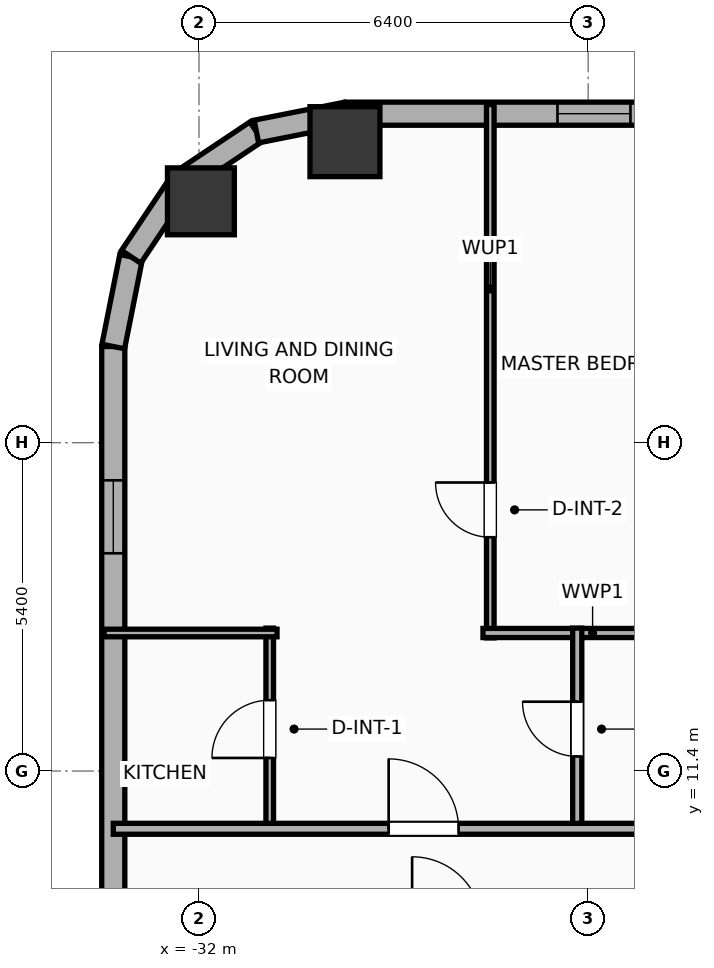
"""IFC4 building model, lengths in metres.
Left out: names, types, materials, properties, quantities, classifications, styles, units other than length and angle.
Written with IfcOpenShell. Run it as: python <this file> out.ifc"""

import sys

from ifc_helpers import new_model, si_unit, direction, frame, frame_2d, origin, origin_2d, place, context, subcontext, project, spatial, rectangle, hollow_rectangle, hollow_circle, extrude, element, fill, save


model = new_model("IFC4")
c1 = context("Model", 3, precision=1e-05, world=origin(), true_north=direction((0.0, 1.0)))
c2 = subcontext(c1, "Body", "Model", "MODEL_VIEW")
j1 = project(units=[si_unit("LENGTHUNIT", "METRE"), si_unit("PLANEANGLEUNIT", "RADIAN")], contexts=[c1])
p1 = place(None, origin())
s1 = spatial("IfcSite", under=j1, at=p1, CompositionType="ELEMENT")
p2 = place(p1, origin())
s2 = spatial("IfcBuilding", under=s1, at=p2, CompositionType="ELEMENT")
p3 = place(p2, frame((0.0, 0.0, 57.2)))
s3 = spatial("IfcBuildingStorey", under=s2, at=p3, CompositionType="ELEMENT", Elevation=57.2)
p4 = place(p3, frame((-29.6, 21.75, 0.0), z_axis=(0.0, 0.0, 1.0), x_axis=(1.0, 0.0, 0.0)))
e1 = element("IfcColumn", 1, at=p4, inside=s3, PredefinedType="COLUMN", context=c2, shape_type="SweptSolid", body=[
    extrude(hollow_rectangle(XDim=1.15, YDim=1.15, WallThickness=0.04, at=origin_2d()), origin(), (0.0, 0.0, 1.0), 3.9),
])
p5 = place(p3, frame((-31.969, 20.769, 0.0), z_axis=(0.0, 0.0, 1.0), x_axis=(1.0, 0.0, 0.0)))
e2 = element("IfcColumn", 2, at=p5, inside=s3, PredefinedType="COLUMN", context=c2, shape_type="SweptSolid", body=[
    extrude(hollow_circle(Radius=0.55, WallThickness=0.036, at=origin_2d()), origin(), (0.0, 0.0, 1.0), 3.9),
])
p6 = place(p3, frame((-33.41, -18.381, 0.0), z_axis=(0.0, 0.0, 1.0), x_axis=(0.0, 1.0, 0.0)))
e3 = element("IfcWall", 3, at=p6, inside=s3, PredefinedType="ELEMENTEDWALL", context=c2, shape_type="SweptSolid", body=[
    extrude(rectangle(XDim=36.763, YDim=0.38, at=frame_2d((18.381, 0.0))), origin(), (0.0, 0.0, 1.0), 3.65),
])
p7 = place(p6, frame((33.362, 0.0, 0.75)))
e4 = element("IfcOpeningElement", 4, at=p7, cuts=e3, PredefinedType="OPENING", context=c2, shape_type="SweptSolid", body=[
    extrude(rectangle(XDim=1.2, YDim=2.05, at=frame_2d((0.6, 1.025))), frame((0.0, 0.2, 0.0), z_axis=(0.0, -1.0, 0.0), x_axis=(1.0, 0.0, 0.0)), (0.0, 0.0, 1.0), 0.4),
])
p8 = place(p6, frame((22.301, 0.0, 0.75)))
e5 = element("IfcOpeningElement", 5, at=p8, cuts=e3, PredefinedType="OPENING", context=c2, shape_type="SweptSolid", body=[
    extrude(rectangle(XDim=1.2, YDim=2.05, at=frame_2d((0.6, 1.025))), frame((0.0, 0.2, 0.0), z_axis=(0.0, -1.0, 0.0), x_axis=(1.0, 0.0, 0.0)), (0.0, 0.0, 1.0), 0.4),
])
p9 = place(p6, frame((13.401, 0.0, 0.75)))
e6 = element("IfcOpeningElement", 6, at=p9, cuts=e3, PredefinedType="OPENING", context=c2, shape_type="SweptSolid", body=[
    extrude(rectangle(XDim=1.2, YDim=2.05, at=frame_2d((0.6, 1.025))), frame((0.0, 0.2, 0.0), z_axis=(0.0, -1.0, 0.0), x_axis=(1.0, 0.0, 0.0)), (0.0, 0.0, 1.0), 0.4),
])
p10 = place(p3, frame((-33.41, 18.381, 0.0), z_axis=(0.0, 0.0, 1.0), x_axis=(0.195086038585, 0.980786132421, 0.0)))
e7 = element("IfcWall", 7, at=p10, inside=s3, PredefinedType="ELEMENTEDWALL", context=c2, shape_type="SweptSolid", body=[
    extrude(rectangle(XDim=1.504, YDim=0.38, at=frame_2d((0.752, 0.0))), origin(), (0.0, 0.0, 1.0), 3.65),
])
p11 = place(p3, frame((-33.116, 19.857, 0.0), z_axis=(0.0, 0.0, 1.0), x_axis=(0.555572577804, 0.831468045563, 0.0)))
e8 = element("IfcWall", 8, at=p11, inside=s3, PredefinedType="ELEMENTEDWALL", context=c2, shape_type="SweptSolid", body=[
    extrude(rectangle(XDim=1.485, YDim=0.38, at=frame_2d((0.742, 0.0))), origin(), (0.0, 0.0, 1.0), 3.65),
])
p12 = place(p3, frame((-32.292, 21.091, 0.0), z_axis=(0.0, 0.0, 1.0), x_axis=(0.831442848281, 0.555610286119, 0.0)))
e9 = element("IfcWall", 9, at=p12, inside=s3, PredefinedType="ELEMENTEDWALL", context=c2, shape_type="SweptSolid", body=[
    extrude(rectangle(XDim=1.485, YDim=0.38, at=frame_2d((0.743, 0.0))), origin(), (0.0, 0.0, 1.0), 3.65),
])
p13 = place(p3, frame((-31.057, 21.917, 0.0), z_axis=(0.0, 0.0, 1.0), x_axis=(0.980786132421, 0.195086038585, 0.0)))
e10 = element("IfcWall", 10, at=p13, inside=s3, PredefinedType="ELEMENTEDWALL", context=c2, shape_type="SweptSolid", body=[
    extrude(rectangle(XDim=1.504, YDim=0.38, at=frame_2d((0.752, 0.0))), origin(), (0.0, 0.0, 1.0), 3.65),
])
p14 = place(p3, frame((-29.581, 22.21, 0.0), z_axis=(0.0, 0.0, 1.0), x_axis=(1.0, 0.0, 0.0)))
e11 = element("IfcWall", 11, at=p14, inside=s3, PredefinedType="ELEMENTEDWALL", context=c2, shape_type="SweptSolid", body=[
    extrude(rectangle(XDim=51.963, YDim=0.38, at=frame_2d((25.981, 0.0))), origin(), (0.0, 0.0, 1.0), 3.65),
])
p15 = place(p14, frame((6.61, 0.0, 0.75)))
e12 = element("IfcOpeningElement", 12, at=p15, cuts=e11, PredefinedType="OPENING", context=c2, shape_type="SweptSolid", body=[
    extrude(rectangle(XDim=2.4, YDim=2.1, at=frame_2d((1.2, 1.05))), frame((0.0, 0.2, 0.0), z_axis=(0.0, -1.0, 0.0), x_axis=(1.0, 0.0, 0.0)), (0.0, 0.0, 1.0), 0.4),
])
p16 = place(p14, frame((24.781, 0.0, 0.75)))
e13 = element("IfcOpeningElement", 13, at=p16, cuts=e11, PredefinedType="OPENING", context=c2, shape_type="SweptSolid", body=[
    extrude(rectangle(XDim=2.4, YDim=2.1, at=frame_2d((1.2, 1.05))), frame((0.0, 0.2, 0.0), z_axis=(0.0, -1.0, 0.0), x_axis=(1.0, 0.0, 0.0)), (0.0, 0.0, 1.0), 0.4),
])
p17 = place(p14, frame((42.952, 0.0, 0.75)))
e14 = element("IfcOpeningElement", 14, at=p17, cuts=e11, PredefinedType="OPENING", context=c2, shape_type="SweptSolid", body=[
    extrude(rectangle(XDim=2.4, YDim=2.1, at=frame_2d((1.2, 1.05))), frame((0.0, 0.2, 0.0), z_axis=(0.0, -1.0, 0.0), x_axis=(1.0, 0.0, 0.0)), (0.0, 0.0, 1.0), 0.4),
])
p18 = place(p14, frame((3.476, 0.0, 0.75)))
e15 = element("IfcOpeningElement", 15, at=p18, cuts=e11, PredefinedType="OPENING", context=c2, shape_type="SweptSolid", body=[
    extrude(rectangle(XDim=1.2, YDim=2.05, at=frame_2d((0.6, 1.025))), frame((0.0, 0.2, 0.0), z_axis=(0.0, -1.0, 0.0), x_axis=(1.0, 0.0, 0.0)), (0.0, 0.0, 1.0), 0.4),
])
p19 = place(p14, frame((11.236, 0.0, 0.75)))
e16 = element("IfcOpeningElement", 16, at=p19, cuts=e11, PredefinedType="OPENING", context=c2, shape_type="SweptSolid", body=[
    extrude(rectangle(XDim=1.2, YDim=2.05, at=frame_2d((0.6, 1.025))), frame((0.0, 0.2, 0.0), z_axis=(0.0, -1.0, 0.0), x_axis=(1.0, 0.0, 0.0)), (0.0, 0.0, 1.0), 0.4),
])
p20 = place(p14, frame((14.576, 0.0, 0.75)))
e17 = element("IfcOpeningElement", 17, at=p20, cuts=e11, PredefinedType="OPENING", context=c2, shape_type="SweptSolid", body=[
    extrude(rectangle(XDim=1.2, YDim=2.05, at=frame_2d((0.6, 1.025))), frame((0.0, 0.2, 0.0), z_axis=(0.0, -1.0, 0.0), x_axis=(1.0, 0.0, 0.0)), (0.0, 0.0, 1.0), 0.4),
])
p21 = place(p14, frame((18.276, 0.0, 0.75)))
e18 = element("IfcOpeningElement", 18, at=p21, cuts=e11, PredefinedType="OPENING", context=c2, shape_type="SweptSolid", body=[
    extrude(rectangle(XDim=1.2, YDim=2.05, at=frame_2d((0.6, 1.025))), frame((0.0, 0.2, 0.0), z_axis=(0.0, -1.0, 0.0), x_axis=(1.0, 0.0, 0.0)), (0.0, 0.0, 1.0), 0.4),
])
p22 = place(p14, frame((21.976, 0.0, 0.75)))
e19 = element("IfcOpeningElement", 19, at=p22, cuts=e11, PredefinedType="OPENING", context=c2, shape_type="SweptSolid", body=[
    extrude(rectangle(XDim=1.2, YDim=2.05, at=frame_2d((0.6, 1.025))), frame((0.0, 0.2, 0.0), z_axis=(0.0, -1.0, 0.0), x_axis=(1.0, 0.0, 0.0)), (0.0, 0.0, 1.0), 0.4),
])
p23 = place(p14, frame((29.136, 0.0, 0.75)))
e20 = element("IfcOpeningElement", 20, at=p23, cuts=e11, PredefinedType="OPENING", context=c2, shape_type="SweptSolid", body=[
    extrude(rectangle(XDim=1.2, YDim=2.05, at=frame_2d((0.6, 1.025))), frame((0.0, 0.2, 0.0), z_axis=(0.0, -1.0, 0.0), x_axis=(1.0, 0.0, 0.0)), (0.0, 0.0, 1.0), 0.4),
])
p24 = place(p14, frame((33.076, 0.0, 0.75)))
e21 = element("IfcOpeningElement", 21, at=p24, cuts=e11, PredefinedType="OPENING", context=c2, shape_type="SweptSolid", body=[
    extrude(rectangle(XDim=1.2, YDim=2.05, at=frame_2d((0.6, 1.025))), frame((0.0, 0.2, 0.0), z_axis=(0.0, -1.0, 0.0), x_axis=(1.0, 0.0, 0.0)), (0.0, 0.0, 1.0), 0.4),
])
p25 = place(p14, frame((36.776, 0.0, 0.75)))
e22 = element("IfcOpeningElement", 22, at=p25, cuts=e11, PredefinedType="OPENING", context=c2, shape_type="SweptSolid", body=[
    extrude(rectangle(XDim=1.2, YDim=2.05, at=frame_2d((0.6, 1.025))), frame((0.0, 0.2, 0.0), z_axis=(0.0, -1.0, 0.0), x_axis=(1.0, 0.0, 0.0)), (0.0, 0.0, 1.0), 0.4),
])
p26 = place(p14, frame((39.931, 0.0, 0.75)))
e23 = element("IfcOpeningElement", 23, at=p26, cuts=e11, PredefinedType="OPENING", context=c2, shape_type="SweptSolid", body=[
    extrude(rectangle(XDim=0.85, YDim=2.05, at=frame_2d((0.425, 1.025))), frame((0.0, 0.2, 0.0), z_axis=(0.0, -1.0, 0.0), x_axis=(1.0, 0.0, 0.0)), (0.0, 0.0, 1.0), 0.4),
])
p27 = place(p14, frame((47.469, 0.0, 0.75)))
e24 = element("IfcOpeningElement", 24, at=p27, cuts=e11, PredefinedType="OPENING", context=c2, shape_type="SweptSolid", body=[
    extrude(rectangle(XDim=1.2, YDim=2.05, at=frame_2d((0.6, 1.025))), frame((0.0, 0.2, 0.0), z_axis=(0.0, -1.0, 0.0), x_axis=(1.0, 0.0, 0.0)), (0.0, 0.0, 1.0), 0.4),
])
p28 = place(p14, frame((49.581, 0.0, 0.75)))
e25 = element("IfcOpeningElement", 25, at=p28, cuts=e11, PredefinedType="OPENING", context=c2, shape_type="SweptSolid", body=[
    extrude(rectangle(XDim=1.2, YDim=2.05, at=frame_2d((0.6, 1.025))), frame((0.0, 0.2, 0.0), z_axis=(0.0, -1.0, 0.0), x_axis=(1.0, 0.0, 0.0)), (0.0, 0.0, 1.0), 0.4),
])
p29 = place(p3, frame((-27.21, 13.59, 0.0), z_axis=(0.0, 0.0, 1.0), x_axis=(0.0, 1.0, 0.0)))
e26 = element("IfcWall", 26, at=p29, inside=s3, PredefinedType="PARTITIONING", context=c2, shape_type="SweptSolid", body=[
    extrude(rectangle(XDim=8.77, YDim=0.125, at=frame_2d((4.385, 0.0))), origin(), (0.0, 0.0, 1.0), 3.65),
])
p30 = place(p29, frame((1.655, 0.0, 0.0)))
e27 = element("IfcOpeningElement", 27, at=p30, cuts=e26, PredefinedType="OPENING", context=c2, shape_type="SweptSolid", body=[
    extrude(rectangle(XDim=0.9, YDim=2.05, at=frame_2d((0.45, 1.025))), frame((0.0, 0.073, 0.0), z_axis=(0.0, -1.0, 0.0), x_axis=(1.0, 0.0, 0.0)), (0.0, 0.0, 1.0), 0.145),
])
p31 = place(p3, frame((-27.33, 13.67, 0.0), z_axis=(0.0, 0.0, 1.0), x_axis=(1.0, 0.0, 0.0)))
e28 = element("IfcWall", 28, at=p31, inside=s3, PredefinedType="PLUMBINGWALL", context=c2, shape_type="SweptSolid", body=[
    extrude(rectangle(XDim=3.605, YDim=0.15, at=frame_2d((1.802, 0.0))), origin(), (0.0, 0.0, 1.0), 3.65),
])
p32 = place(p3, frame((-30.837, 10.43, 0.0), z_axis=(0.0, 0.0, 1.0), x_axis=(0.0, 1.0, 0.0)))
e29 = element("IfcWall", 29, at=p32, inside=s3, PredefinedType="PARTITIONING", context=c2, shape_type="SweptSolid", body=[
    extrude(rectangle(XDim=3.32, YDim=0.125, at=frame_2d((1.66, 0.0))), origin(), (0.0, 0.0, 1.0), 3.65),
])
p33 = place(p32, frame((1.185, 0.0, 0.0)))
e30 = element("IfcOpeningElement", 30, at=p33, cuts=e29, PredefinedType="OPENING", context=c2, shape_type="SweptSolid", body=[
    extrude(rectangle(XDim=0.95, YDim=2.05, at=frame_2d((0.475, 1.025))), frame((0.0, 0.073, 0.0), z_axis=(0.0, -1.0, 0.0), x_axis=(1.0, 0.0, 0.0)), (0.0, 0.0, 1.0), 0.145),
])
p34 = place(p3, frame((-33.56, 13.67, 0.0), z_axis=(0.0, 0.0, 1.0), x_axis=(1.0, 0.0, 0.0)))
e31 = element("IfcWall", 31, at=p34, inside=s3, PredefinedType="PARTITIONING", context=c2, shape_type="SweptSolid", body=[
    extrude(rectangle(XDim=2.843, YDim=0.125, at=frame_2d((1.421, 0.0))), origin(), (0.0, 0.0, 1.0), 3.65),
])
p35 = place(p3, frame((-25.78, 10.43, 0.0), z_axis=(0.0, 0.0, 1.0), x_axis=(0.0, 1.0, 0.0)))
e32 = element("IfcWall", 32, at=p35, inside=s3, PredefinedType="PLUMBINGWALL", context=c2, shape_type="SweptSolid", body=[
    extrude(rectangle(XDim=3.32, YDim=0.15, at=frame_2d((1.66, 0.0))), origin(), (0.0, 0.0, 1.0), 3.65),
])
p36 = place(p35, frame((1.21, 0.0, 0.0)))
e33 = element("IfcOpeningElement", 33, at=p36, cuts=e32, PredefinedType="OPENING", context=c2, shape_type="SweptSolid", body=[
    extrude(rectangle(XDim=0.9, YDim=2.05, at=frame_2d((0.45, 1.025))), frame((0.0, 0.085, 0.0), z_axis=(0.0, -1.0, 0.0), x_axis=(1.0, 0.0, 0.0)), (0.0, 0.0, 1.0), 0.17),
])
p37 = place(p3, frame((-33.41, 10.45, 0.0), z_axis=(0.0, 0.0, 1.0), x_axis=(1.0, 0.0, 0.0)))
e34 = element("IfcWall", 34, at=p37, inside=s3, PredefinedType="PARTITIONING", context=c2, shape_type="SweptSolid", body=[
    extrude(rectangle(XDim=59.62, YDim=0.18, at=frame_2d((29.81, 0.0))), origin(), (0.0, 0.0, 1.0), 3.65),
])
p38 = place(p37, frame((4.529, 0.0, 0.0)))
e35 = element("IfcOpeningElement", 35, at=p38, cuts=e34, PredefinedType="OPENING", context=c2, shape_type="SweptSolid", body=[
    extrude(rectangle(XDim=1.15, YDim=2.05, at=frame_2d((0.575, 1.025))), frame((0.0, 0.1, 0.0), z_axis=(0.0, -1.0, 0.0), x_axis=(1.0, 0.0, 0.0)), (0.0, 0.0, 1.0), 0.2),
])
p39 = place(p37, frame((12.899, 0.0, 0.0)))
e36 = element("IfcOpeningElement", 36, at=p39, cuts=e34, PredefinedType="OPENING", context=c2, shape_type="SweptSolid", body=[
    extrude(rectangle(XDim=1.15, YDim=2.05, at=frame_2d((0.575, 1.025))), frame((0.0, 0.1, 0.0), z_axis=(0.0, -1.0, 0.0), x_axis=(1.0, 0.0, 0.0)), (0.0, 0.0, 1.0), 0.2),
])
p40 = place(p37, frame((20.298, 0.0, 0.0)))
e37 = element("IfcOpeningElement", 37, at=p40, cuts=e34, PredefinedType="OPENING", context=c2, shape_type="SweptSolid", body=[
    extrude(rectangle(XDim=1.15, YDim=2.05, at=frame_2d((0.575, 1.025))), frame((0.0, 0.1, 0.0), z_axis=(0.0, -1.0, 0.0), x_axis=(1.0, 0.0, 0.0)), (0.0, 0.0, 1.0), 0.2),
])
p41 = place(p37, frame((27.703, 0.0, 0.0)))
e38 = element("IfcOpeningElement", 38, at=p41, cuts=e34, PredefinedType="OPENING", context=c2, shape_type="SweptSolid", body=[
    extrude(rectangle(XDim=1.15, YDim=2.05, at=frame_2d((0.575, 1.025))), frame((0.0, 0.1, 0.0), z_axis=(0.0, -1.0, 0.0), x_axis=(1.0, 0.0, 0.0)), (0.0, 0.0, 1.0), 0.2),
])
p42 = place(p37, frame((35.102, 0.0, 0.0)))
e39 = element("IfcOpeningElement", 39, at=p42, cuts=e34, PredefinedType="OPENING", context=c2, shape_type="SweptSolid", body=[
    extrude(rectangle(XDim=1.15, YDim=2.05, at=frame_2d((0.575, 1.025))), frame((0.0, 0.1, 0.0), z_axis=(0.0, -1.0, 0.0), x_axis=(1.0, 0.0, 0.0)), (0.0, 0.0, 1.0), 0.2),
])
p43 = place(p37, frame((42.5, 0.0, 0.0)))
e40 = element("IfcOpeningElement", 40, at=p43, cuts=e34, PredefinedType="OPENING", context=c2, shape_type="SweptSolid", body=[
    extrude(rectangle(XDim=1.15, YDim=2.05, at=frame_2d((0.575, 1.025))), frame((0.0, 0.1, 0.0), z_axis=(0.0, -1.0, 0.0), x_axis=(1.0, 0.0, 0.0)), (0.0, 0.0, 1.0), 0.2),
])
p44 = place(p37, frame((48.099, 0.0, 0.0)))
e41 = element("IfcOpeningElement", 41, at=p44, cuts=e34, PredefinedType="OPENING", context=c2, shape_type="SweptSolid", body=[
    extrude(rectangle(XDim=1.15, YDim=2.05, at=frame_2d((0.575, 1.025))), frame((0.0, 0.1, 0.0), z_axis=(0.0, -1.0, 0.0), x_axis=(1.0, 0.0, 0.0)), (0.0, 0.0, 1.0), 0.2),
])
p45 = place(p37, frame((56.117, 0.0, 0.0)))
e42 = element("IfcOpeningElement", 42, at=p45, cuts=e34, PredefinedType="OPENING", context=c2, shape_type="SweptSolid", body=[
    extrude(rectangle(XDim=0.9, YDim=2.05, at=frame_2d((0.45, 1.025))), frame((0.0, 0.1, 0.0), z_axis=(0.0, -1.0, 0.0), x_axis=(1.0, 0.0, 0.0)), (0.0, 0.0, 1.0), 0.2),
])
p46 = place(p7, origin())
e43 = element("IfcWindow", 43, at=p46, inside=s3, PartitioningType="SINGLE_PANEL", PredefinedType="WINDOW", context=c2, shape_type="SweptSolid", body=[
    extrude(rectangle(XDim=1.2, YDim=2.05, at=frame_2d((0.6, 1.025))), frame((0.0, 0.03, 0.0), z_axis=(0.0, -1.0, 0.0), x_axis=(1.0, 0.0, 0.0)), (0.0, 0.0, 1.0), 0.06),
])
fill(e4, e43)
p47 = place(p18, origin())
e44 = element("IfcWindow", 44, at=p47, inside=s3, PartitioningType="SINGLE_PANEL", PredefinedType="WINDOW", context=c2, shape_type="SweptSolid", body=[
    extrude(rectangle(XDim=1.2, YDim=2.05, at=frame_2d((0.6, 1.025))), frame((0.0, 0.03, 0.0), z_axis=(0.0, -1.0, 0.0), x_axis=(1.0, 0.0, 0.0)), (0.0, 0.0, 1.0), 0.06),
])
fill(e15, e44)
p48 = place(p30, origin())
e45 = element("IfcDoor", 45, at=p48, inside=s3, OperationType="SINGLE_SWING_RIGHT", PredefinedType="DOOR", context=c2, shape_type="SweptSolid", body=[
    extrude(rectangle(XDim=0.9, YDim=2.05, at=frame_2d((0.45, 1.025))), frame((0.0, 0.025, 0.0), z_axis=(0.0, -1.0, 0.0), x_axis=(1.0, 0.0, 0.0)), (0.0, 0.0, 1.0), 0.05),
])
fill(e27, e45)
p49 = place(p33, origin())
e46 = element("IfcDoor", 46, at=p49, inside=s3, OperationType="SINGLE_SWING_LEFT", PredefinedType="DOOR", context=c2, shape_type="SweptSolid", body=[
    extrude(rectangle(XDim=0.95, YDim=2.05, at=frame_2d((0.475, 1.025))), frame((0.0, 0.025, 0.0), z_axis=(0.0, -1.0, 0.0), x_axis=(1.0, 0.0, 0.0)), (0.0, 0.0, 1.0), 0.05),
])
fill(e30, e46)
p50 = place(p36, origin())
e47 = element("IfcDoor", 47, at=p50, inside=s3, OperationType="SINGLE_SWING_RIGHT", PredefinedType="DOOR", context=c2, shape_type="SweptSolid", body=[
    extrude(rectangle(XDim=0.9, YDim=2.05, at=frame_2d((0.45, 1.025))), frame((0.0, 0.025, 0.0), z_axis=(0.0, -1.0, 0.0), x_axis=(1.0, 0.0, 0.0)), (0.0, 0.0, 1.0), 0.05),
])
fill(e33, e47)
p51 = place(p38, origin())
e48 = element("IfcDoor", 48, at=p51, inside=s3, OperationType="SINGLE_SWING_LEFT", PredefinedType="DOOR", context=c2, shape_type="SweptSolid", body=[
    extrude(rectangle(XDim=1.15, YDim=2.05, at=frame_2d((0.575, 1.025))), frame((0.0, 0.025, 0.0), z_axis=(0.0, -1.0, 0.0), x_axis=(1.0, 0.0, 0.0)), (0.0, 0.0, 1.0), 0.05),
])
fill(e35, e48)
save(model, sys.argv[1])
